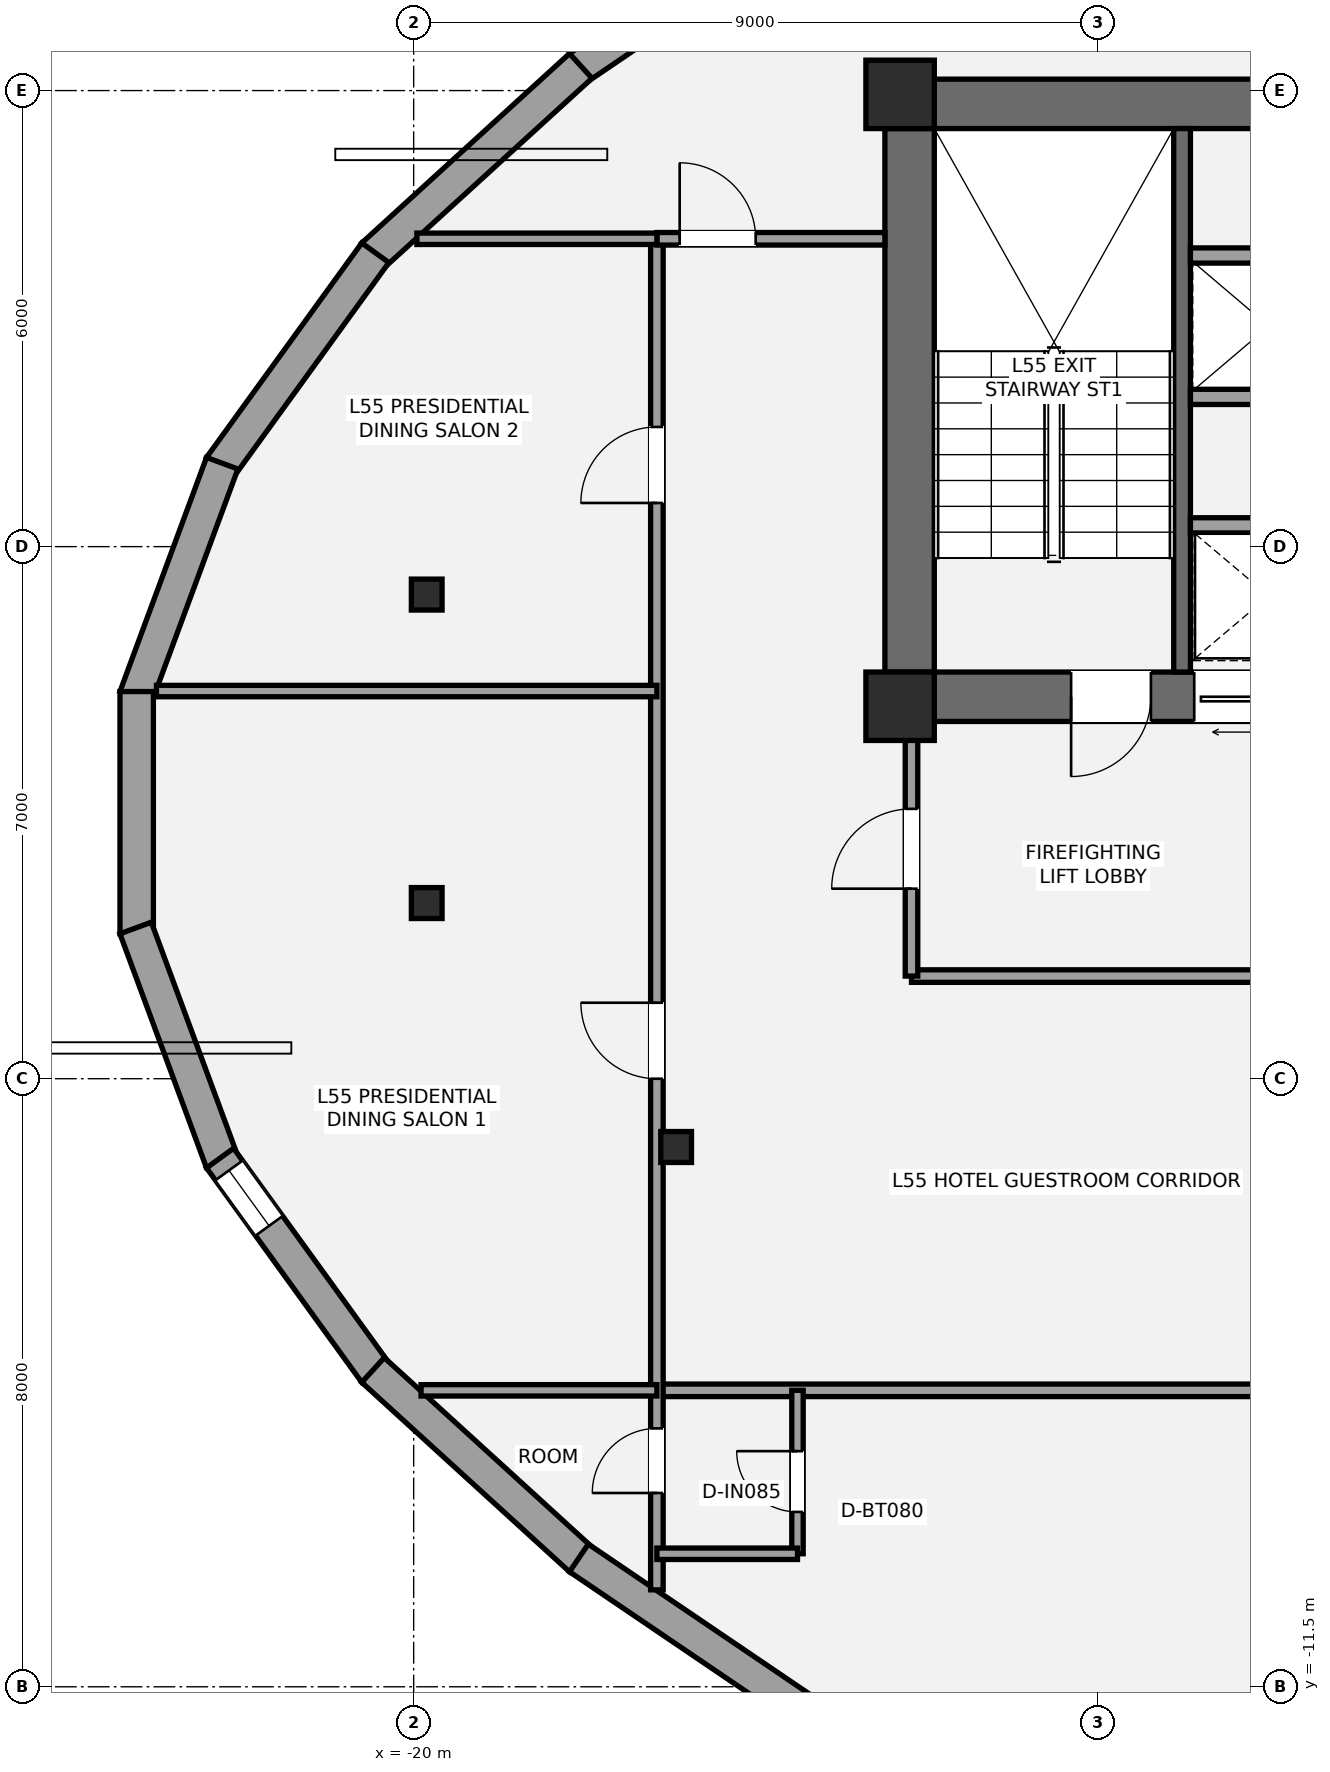
"""IFC4 building model, lengths in metres.
Left out: names, types, materials, properties, quantities, classifications, styles, units other than length and angle.
Written with IfcOpenShell. Run it as: python <this file> out.ifc"""

import sys

from ifc_helpers import new_model, si_unit, direction, frame, frame_2d, origin, origin_2d, place, context, subcontext, project, spatial, rectangle, i_section, extrude, element, fill, save


model = new_model("IFC4")
c1 = context("Model", 3, precision=1e-05, world=origin(), true_north=direction((0.0, 1.0)))
c2 = subcontext(c1, "Body", "Model", "MODEL_VIEW")
j1 = project(units=[si_unit("LENGTHUNIT", "METRE"), si_unit("PLANEANGLEUNIT", "RADIAN")], contexts=[c1])
p1 = place(None, origin())
s1 = spatial("IfcSite", under=j1, at=p1, CompositionType="ELEMENT")
p2 = place(p1, origin())
s2 = spatial("IfcBuilding", under=s1, at=p2, CompositionType="ELEMENT")
p3 = place(p2, frame((0.0, 0.0, 198.2)))
s3 = spatial("IfcBuildingStorey", under=s2, at=p3, CompositionType="ELEMENT", Elevation=198.2)
p4 = place(p3, frame((-13.475, 1.2, 0.0), z_axis=(0.0, 0.0, 1.0), x_axis=(0.0, 1.0, 0.0)))
e1 = element("IfcWall", 1, at=p4, inside=s3, PredefinedType="SHEAR", context=c2, shape_type="SweptSolid", body=[
    extrude(rectangle(XDim=8.45, YDim=0.65, at=frame_2d((4.225, 0.0))), origin(), (0.0, 0.0, 1.0), 3.2),
])
p5 = place(p3, frame((-13.8, 9.325, 0.0), z_axis=(0.0, 0.0, 1.0), x_axis=(1.0, 0.0, 0.0)))
e2 = element("IfcWall", 2, at=p5, inside=s3, PredefinedType="SHEAR", context=c2, shape_type="SweptSolid", body=[
    extrude(rectangle(XDim=9.325, YDim=0.65, at=frame_2d((4.663, 0.0))), origin(), (0.0, 0.0, 1.0), 3.2),
])
p6 = place(p3, frame((-4.875, 1.525, 0.0), z_axis=(0.0, 0.0, 1.0), x_axis=(-1.0, 0.0, 0.0)))
e3 = element("IfcWall", 3, at=p6, inside=s3, PredefinedType="SHEAR", context=c2, shape_type="SweptSolid", body=[
    extrude(rectangle(XDim=8.925, YDim=0.65, at=frame_2d((4.462, 0.0))), origin(), (0.0, 0.0, 1.0), 3.2),
])
p7 = place(p6, frame((5.425, 0.0, 0.0)))
e4 = element("IfcOpeningElement", 4, at=p7, cuts=e3, PredefinedType="OPENING", context=c2, shape_type="SweptSolid", body=[
    extrude(rectangle(XDim=1.05, YDim=2.15, at=frame_2d((0.525, 1.075))), frame((0.0, 0.335, 0.0), z_axis=(0.0, -1.0, 0.0), x_axis=(1.0, 0.0, 0.0)), (0.0, 0.0, 1.0), 0.67),
])
p8 = place(p6, frame((3.755, 0.0, 0.0)))
e5 = element("IfcOpeningElement", 5, at=p8, cuts=e3, PredefinedType="OPENING", context=c2, shape_type="SweptSolid", body=[
    extrude(rectangle(XDim=1.1, YDim=2.2, at=frame_2d((0.55, 1.1))), frame((0.0, 0.335, 0.0), z_axis=(0.0, -1.0, 0.0), x_axis=(1.0, 0.0, 0.0)), (0.0, 0.0, 1.0), 0.67),
])
p9 = place(p3, frame((-9.89, 1.85, 0.0), z_axis=(0.0, 0.0, 1.0), x_axis=(0.0, 1.0, 0.0)))
e6 = element("IfcWall", 6, at=p9, inside=s3, PredefinedType="SHEAR", context=c2, shape_type="SweptSolid", body=[
    extrude(rectangle(XDim=7.15, YDim=0.22, at=frame_2d((3.575, 0.0))), origin(), (0.0, 0.0, 1.0), 3.2),
])
for number, where, z_axis, x_axis in (
    (7, (-13.6, 1.4, 0.0), (0.0, 0.0, 1.0), (1.0, 0.0, 0.0)),
    (8, (-13.6, 9.45, 0.0), (0.0, 0.0, 1.0), (1.0, 0.0, 0.0)),
):
    element("IfcColumn", number, at=place(p3, frame(where, z_axis=z_axis, x_axis=x_axis)), inside=s3, PredefinedType="COLUMN", context=c2, shape_type="SweptSolid", body=[
        extrude(rectangle(XDim=0.9, YDim=0.9, at=origin_2d()), origin(), (0.0, 0.0, 1.0), 3.2),
    ])
for number, where, z_axis, x_axis in (
    (9, (-19.828, 2.869, 0.0), (0.0, 0.0, 1.0), (1.0, 0.0, 0.0)),
    (10, (-19.828, -1.189, 0.0), (0.0, 0.0, 1.0), (1.0, 0.0, 0.0)),
    (11, (-16.547, -4.398, 0.0), (0.0, 0.0, 1.0), (1.0, 0.0, 0.0)),
):
    element("IfcColumn", number, at=place(p3, frame(where, z_axis=z_axis, x_axis=x_axis)), inside=s3, PredefinedType="COLUMN", context=c2, shape_type="SweptSolid", body=[
        extrude(i_section(OverallWidth=0.404, OverallDepth=0.407, WebThickness=0.027, FlangeThickness=0.044, at=origin_2d()), origin(), (0.0, 0.0, 1.0), 3.2),
    ])
p10 = place(p3, frame((-17.826, 9.805, 0.0), z_axis=(0.0, 0.0, 1.0), x_axis=(0.827697624009, 0.561174342972, 0.0)))
e12 = element("IfcWall", 12, at=p10, inside=s3, PredefinedType="STANDARD", context=c2, shape_type="SweptSolid", body=[
    extrude(rectangle(XDim=3.888, YDim=0.44, at=frame_2d((1.944, 0.0))), origin(), (0.0, 0.0, 1.0), 2.255),
])
p11 = place(p10, frame((2.789, 0.0, 0.58)))
e13 = element("IfcOpeningElement", 13, at=p11, cuts=e12, PredefinedType="OPENING", context=c2, shape_type="SweptSolid", body=[
    extrude(rectangle(XDim=0.9, YDim=1.35, at=frame_2d((0.45, 0.675))), frame((0.0, 0.23, 0.0), z_axis=(0.0, -1.0, 0.0), x_axis=(1.0, 0.0, 0.0)), (0.0, 0.0, 1.0), 0.46),
])
p12 = place(p3, frame((-20.535, 7.333, 0.0), z_axis=(0.0, 0.0, 1.0), x_axis=(0.738992571182, 0.67371357396, 0.0)))
e14 = element("IfcWall", 14, at=p12, inside=s3, PredefinedType="STANDARD", context=c2, shape_type="SweptSolid", body=[
    extrude(rectangle(XDim=3.699, YDim=0.44, at=frame_2d((1.849, 0.0))), origin(), (0.0, 0.0, 1.0), 2.255),
])
p13 = place(p3, frame((-22.547, 4.545, 0.0), z_axis=(0.0, 0.0, 1.0), x_axis=(0.586378206793, 0.810037405678, 0.0)))
e15 = element("IfcWall", 15, at=p13, inside=s3, PredefinedType="STANDARD", context=c2, shape_type="SweptSolid", body=[
    extrude(rectangle(XDim=3.483, YDim=0.44, at=frame_2d((1.742, 0.0))), origin(), (0.0, 0.0, 1.0), 2.255),
])
p14 = place(p3, frame((-23.658, 1.517, 0.0), z_axis=(0.0, 0.0, 1.0), x_axis=(0.346793746495, 0.937941414691, 0.0)))
e16 = element("IfcWall", 16, at=p14, inside=s3, PredefinedType="STANDARD", context=c2, shape_type="SweptSolid", body=[
    extrude(rectangle(XDim=3.284, YDim=0.44, at=frame_2d((1.642, 0.0))), origin(), (0.0, 0.0, 1.0), 2.255),
])
p15 = place(p3, frame((-23.644, -1.594, 0.0), z_axis=(0.0, 0.0, 1.0), x_axis=(0.0, 1.0, 0.0)))
e17 = element("IfcWall", 17, at=p15, inside=s3, PredefinedType="STANDARD", context=c2, shape_type="SweptSolid", body=[
    extrude(rectangle(XDim=3.187, YDim=0.44, at=frame_2d((1.594, 0.0))), origin(), (0.0, 0.0, 1.0), 2.259),
])
p16 = place(p3, frame((-22.519, -4.597, 0.0), z_axis=(0.0, 0.0, 1.0), x_axis=(-0.346793746495, 0.937941414691, 0.0)))
e18 = element("IfcWall", 18, at=p16, inside=s3, PredefinedType="STANDARD", context=c2, shape_type="SweptSolid", body=[
    extrude(rectangle(XDim=3.284, YDim=0.44, at=frame_2d((1.642, 0.0))), origin(), (0.0, 0.0, 1.0), 2.255),
])
p17 = place(p3, frame((-20.505, -7.366, 0.0), z_axis=(0.0, 0.0, 1.0), x_axis=(-0.586378206793, 0.810037405678, 0.0)))
e19 = element("IfcWall", 19, at=p17, inside=s3, PredefinedType="STANDARD", context=c2, shape_type="SweptSolid", body=[
    extrude(rectangle(XDim=3.483, YDim=0.44, at=frame_2d((1.742, 0.0))), origin(), (0.0, 0.0, 1.0), 2.255),
])
p18 = place(p17, frame((2.383, 0.0, 0.42)))
e20 = element("IfcOpeningElement", 20, at=p18, cuts=e19, PredefinedType="OPENING", context=c2, shape_type="SweptSolid", body=[
    extrude(rectangle(XDim=0.9, YDim=1.35, at=frame_2d((0.45, 0.675))), frame((0.0, 0.23, 0.0), z_axis=(0.0, -1.0, 0.0), x_axis=(1.0, 0.0, 0.0)), (0.0, 0.0, 1.0), 0.46),
])
p19 = place(p3, frame((-17.801, -9.824, 0.0), z_axis=(0.0, 0.0, 1.0), x_axis=(-0.738992571182, 0.67371357396, 0.0)))
e21 = element("IfcWall", 21, at=p19, inside=s3, PredefinedType="STANDARD", context=c2, shape_type="SweptSolid", body=[
    extrude(rectangle(XDim=3.699, YDim=0.44, at=frame_2d((1.849, 0.0))), origin(), (0.0, 0.0, 1.0), 2.255),
])
p20 = place(p3, frame((-14.607, -11.987, 0.0), z_axis=(0.0, 0.0, 1.0), x_axis=(-0.827697624009, 0.561174342972, 0.0)))
e22 = element("IfcWall", 22, at=p20, inside=s3, PredefinedType="STANDARD", context=c2, shape_type="SweptSolid", body=[
    extrude(rectangle(XDim=3.888, YDim=0.44, at=frame_2d((1.944, 0.0))), origin(), (0.0, 0.0, 1.0), 2.255),
])
p21 = place(p3, frame((-13.45, -2.15, 0.0), z_axis=(0.0, 0.0, 1.0), x_axis=(1.0, 0.0, 0.0)))
e23 = element("IfcWall", 23, at=p21, inside=s3, PredefinedType="PARTITIONING", context=c2, shape_type="SweptSolid", body=[
    extrude(rectangle(XDim=6.25, YDim=0.165, at=frame_2d((3.125, 0.0))), origin(), (0.0, 0.0, 1.0), 2.96),
])
p22 = place(p3, frame((-13.45, -2.15, 0.0), z_axis=(0.0, 0.0, 1.0), x_axis=(0.0, 1.0, 0.0)))
e24 = element("IfcWall", 24, at=p22, inside=s3, PredefinedType="PARTITIONING", context=c2, shape_type="SweptSolid", body=[
    extrude(rectangle(XDim=3.4, YDim=0.165, at=frame_2d((1.7, 0.0))), origin(), (0.0, 0.0, 1.0), 2.413),
])
p23 = place(p22, frame((1.15, 0.0, 0.0)))
e25 = element("IfcOpeningElement", 25, at=p23, cuts=e24, PredefinedType="OPENING", context=c2, shape_type="SweptSolid", body=[
    extrude(rectangle(XDim=1.05, YDim=2.15, at=frame_2d((0.525, 1.075))), frame((0.0, 0.093, 0.0), z_axis=(0.0, -1.0, 0.0), x_axis=(1.0, 0.0, 0.0)), (0.0, 0.0, 1.0), 0.185),
])
for number, where, z_axis, x_axis in (
    (26, (-9.78, 3.78, 0.0), (0.0, 0.0, 1.0), (1.0, 0.0, 0.0)),
    (27, (-9.78, 5.47, 0.0), (0.0, 0.0, 1.0), (1.0, 0.0, 0.0)),
    (28, (-9.78, 7.33, 0.0), (0.0, 0.0, 1.0), (1.0, 0.0, 0.0)),
):
    element("IfcWall", number, at=place(p3, frame(where, z_axis=z_axis, x_axis=x_axis)), inside=s3, PredefinedType="SOLIDWALL", context=c2, shape_type="SweptSolid", body=[
        extrude(rectangle(XDim=4.255, YDim=0.2, at=frame_2d((2.127, 0.0))), origin(), (0.0, 0.0, 1.0), 2.96),
    ])
p24 = place(p3, frame((-16.8, -7.6, 0.0), z_axis=(0.0, 0.0, 1.0), x_axis=(1.0, 0.0, 0.0)))
e29 = element("IfcWall", 29, at=p24, inside=s3, PredefinedType="PARTITIONING", context=c2, shape_type="SweptSolid", body=[
    extrude(rectangle(XDim=32.35, YDim=0.165, at=frame_2d((16.175, 0.0))), origin(), (0.0, 0.0, 1.0), 2.338),
])
p25 = place(p24, frame((15.45, 0.0, 0.0)))
e30 = element("IfcOpeningElement", 30, at=p25, cuts=e29, PredefinedType="OPENING", context=c2, shape_type="SweptSolid", body=[
    extrude(rectangle(XDim=0.95, YDim=2.15, at=frame_2d((0.475, 1.075))), frame((0.0, 0.093, 0.0), z_axis=(0.0, -1.0, 0.0), x_axis=(1.0, 0.0, 0.0)), (0.0, 0.0, 1.0), 0.185),
])
p26 = place(p24, frame((31.0, 0.0, 0.0)))
e31 = element("IfcOpeningElement", 31, at=p26, cuts=e29, PredefinedType="OPENING", context=c2, shape_type="SweptSolid", body=[
    extrude(rectangle(XDim=0.95, YDim=2.15, at=frame_2d((0.475, 1.075))), frame((0.0, 0.093, 0.0), z_axis=(0.0, -1.0, 0.0), x_axis=(1.0, 0.0, 0.0)), (0.0, 0.0, 1.0), 0.185),
])
p27 = place(p3, frame((-16.8, -10.225, 0.0), z_axis=(0.0, 0.0, 1.0), x_axis=(0.0, 1.0, 0.0)))
e32 = element("IfcWall", 32, at=p27, inside=s3, PredefinedType="PARTITIONING", context=c2, shape_type="SweptSolid", body=[
    extrude(rectangle(XDim=17.775, YDim=0.165, at=frame_2d((8.888, 0.0))), origin(), (0.0, 0.0, 1.0), 2.338),
])
p28 = place(p27, frame((1.274, 0.0, 0.0)))
e33 = element("IfcOpeningElement", 33, at=p28, cuts=e32, PredefinedType="OPENING", context=c2, shape_type="SweptSolid", body=[
    extrude(rectangle(XDim=0.85, YDim=2.1, at=frame_2d((0.425, 1.05))), frame((0.0, 0.093, 0.0), z_axis=(0.0, -1.0, 0.0), x_axis=(1.0, 0.0, 0.0)), (0.0, 0.0, 1.0), 0.185),
])
p29 = place(p27, frame((6.725, 0.0, 0.0)))
e34 = element("IfcOpeningElement", 34, at=p29, cuts=e32, PredefinedType="OPENING", context=c2, shape_type="SweptSolid", body=[
    extrude(rectangle(XDim=1.0, YDim=2.15, at=frame_2d((0.5, 1.075))), frame((0.0, 0.093, 0.0), z_axis=(0.0, -1.0, 0.0), x_axis=(1.0, 0.0, 0.0)), (0.0, 0.0, 1.0), 0.185),
])
p30 = place(p27, frame((14.3, 0.0, 0.0)))
e35 = element("IfcOpeningElement", 35, at=p30, cuts=e32, PredefinedType="OPENING", context=c2, shape_type="SweptSolid", body=[
    extrude(rectangle(XDim=1.0, YDim=2.15, at=frame_2d((0.5, 1.075))), frame((0.0, 0.093, 0.0), z_axis=(0.0, -1.0, 0.0), x_axis=(1.0, 0.0, 0.0)), (0.0, 0.0, 1.0), 0.185),
])
p31 = place(p3, frame((-16.8, 7.55, 0.0), z_axis=(0.0, 0.0, 1.0), x_axis=(1.0, 0.0, 0.0)))
e36 = element("IfcWall", 36, at=p31, inside=s3, PredefinedType="PARTITIONING", context=c2, shape_type="SweptSolid", body=[
    extrude(rectangle(XDim=3.0, YDim=0.165, at=frame_2d((1.5, 0.0))), origin(), (0.0, 0.0, 1.0), 2.413),
])
p32 = place(p31, frame((0.3, 0.0, 0.0)))
e37 = element("IfcOpeningElement", 37, at=p32, cuts=e36, PredefinedType="OPENING", context=c2, shape_type="SweptSolid", body=[
    extrude(rectangle(XDim=1.0, YDim=2.15, at=frame_2d((0.5, 1.075))), frame((0.0, 0.093, 0.0), z_axis=(0.0, -1.0, 0.0), x_axis=(1.0, 0.0, 0.0)), (0.0, 0.0, 1.0), 0.185),
])
p33 = place(p3, frame((-19.958, 7.55, 0.0), z_axis=(0.0, 0.0, 1.0), x_axis=(1.0, 0.0, 0.0)))
e38 = element("IfcWall", 38, at=p33, inside=s3, PredefinedType="PLUMBINGWALL", context=c2, shape_type="SweptSolid", body=[
    extrude(rectangle(XDim=3.158, YDim=0.15, at=frame_2d((1.579, 0.0))), origin(), (0.0, 0.0, 1.0), 2.413),
])
p34 = place(p3, frame((-19.903, -7.6, 0.0), z_axis=(0.0, 0.0, 1.0), x_axis=(1.0, 0.0, 0.0)))
e39 = element("IfcWall", 39, at=p34, inside=s3, PredefinedType="PLUMBINGWALL", context=c2, shape_type="SweptSolid", body=[
    extrude(rectangle(XDim=3.103, YDim=0.15, at=frame_2d((1.551, 0.0))), origin(), (0.0, 0.0, 1.0), 2.96),
])
p35 = place(p3, frame((-14.95, -9.75, 0.0), z_axis=(0.0, 0.0, 1.0), x_axis=(0.0, 1.0, 0.0)))
e40 = element("IfcWall", 40, at=p35, inside=s3, PredefinedType="PLUMBINGWALL", context=c2, shape_type="SweptSolid", body=[
    extrude(rectangle(XDim=2.15, YDim=0.15, at=frame_2d((1.075, 0.0))), origin(), (0.0, 0.0, 1.0), 2.96),
])
p36 = place(p35, frame((0.55, 0.0, 0.0)))
e41 = element("IfcOpeningElement", 41, at=p36, cuts=e40, PredefinedType="OPENING", context=c2, shape_type="SweptSolid", body=[
    extrude(rectangle(XDim=0.8, YDim=2.1, at=frame_2d((0.4, 1.05))), frame((0.0, 0.085, 0.0), z_axis=(0.0, -1.0, 0.0), x_axis=(1.0, 0.0, 0.0)), (0.0, 0.0, 1.0), 0.17),
])
p37 = place(p3, frame((-16.8, -9.75, 0.0), z_axis=(0.0, 0.0, 1.0), x_axis=(1.0, 0.0, 0.0)))
e42 = element("IfcWall", 42, at=p37, inside=s3, PredefinedType="PLUMBINGWALL", context=c2, shape_type="SweptSolid", body=[
    extrude(rectangle(XDim=1.85, YDim=0.15, at=frame_2d((0.925, 0.0))), origin(), (0.0, 0.0, 1.0), 2.413),
])
p38 = place(p3, frame((-23.384, 1.6, 0.0), z_axis=(0.0, 0.0, 1.0), x_axis=(1.0, 0.0, 0.0)))
e43 = element("IfcWall", 43, at=p38, inside=s3, PredefinedType="PLUMBINGWALL", context=c2, shape_type="SweptSolid", body=[
    extrude(rectangle(XDim=6.584, YDim=0.15, at=frame_2d((3.292, 0.0))), origin(), (0.0, 0.0, 1.0), 2.413),
])
p39 = place(p18, origin())
e44 = element("IfcWindow", 44, at=p39, inside=s3, PartitioningType="SINGLE_PANEL", PredefinedType="WINDOW", context=c2, shape_type="SweptSolid", body=[
    extrude(rectangle(XDim=0.9, YDim=1.35, at=frame_2d((0.45, 0.675))), frame((0.0, -0.01, 0.0), z_axis=(0.0, -1.0, 0.0), x_axis=(1.0, 0.0, 0.0)), (0.0, 0.0, 1.0), 0.06),
])
fill(e20, e44)
p40 = place(p7, origin())
e45 = element("IfcDoor", 45, at=p40, inside=s3, OperationType="SINGLE_SWING_RIGHT", PredefinedType="DOOR", context=c2, shape_type="SweptSolid", body=[
    extrude(rectangle(XDim=1.05, YDim=2.15, at=frame_2d((0.525, 1.075))), frame((0.0, 0.025, 0.0), z_axis=(0.0, -1.0, 0.0), x_axis=(1.0, 0.0, 0.0)), (0.0, 0.0, 1.0), 0.05),
])
fill(e4, e45)
p41 = place(p23, origin())
e46 = element("IfcDoor", 46, at=p41, inside=s3, OperationType="SINGLE_SWING_LEFT", PredefinedType="DOOR", context=c2, shape_type="SweptSolid", body=[
    extrude(rectangle(XDim=1.05, YDim=2.15, at=frame_2d((0.525, 1.075))), frame((0.0, 0.025, 0.0), z_axis=(0.0, -1.0, 0.0), x_axis=(1.0, 0.0, 0.0)), (0.0, 0.0, 1.0), 0.05),
])
fill(e25, e46)
p42 = place(p8, origin())
e47 = element("IfcDoor", 47, at=p42, inside=s3, OperationType="SLIDING_TO_LEFT", PredefinedType="DOOR", context=c2, shape_type="SweptSolid", body=[
    extrude(rectangle(XDim=1.1, YDim=2.2, at=frame_2d((0.55, 1.1))), frame((0.0, 0.025, 0.0), z_axis=(0.0, -1.0, 0.0), x_axis=(1.0, 0.0, 0.0)), (0.0, 0.0, 1.0), 0.05),
])
fill(e5, e47)
p43 = place(p32, origin())
e48 = element("IfcDoor", 48, at=p43, inside=s3, OperationType="SINGLE_SWING_LEFT", PredefinedType="DOOR", context=c2, shape_type="SweptSolid", body=[
    extrude(rectangle(XDim=1.0, YDim=2.15, at=frame_2d((0.5, 1.075))), frame((0.0, 0.025, 0.0), z_axis=(0.0, -1.0, 0.0), x_axis=(1.0, 0.0, 0.0)), (0.0, 0.0, 1.0), 0.05),
])
fill(e37, e48)
p44 = place(p28, origin())
e49 = element("IfcDoor", 49, at=p44, inside=s3, OperationType="SINGLE_SWING_LEFT", PredefinedType="DOOR", context=c2, shape_type="SweptSolid", body=[
    extrude(rectangle(XDim=0.85, YDim=2.1, at=frame_2d((0.425, 1.05))), frame((0.0, 0.025, 0.0), z_axis=(0.0, -1.0, 0.0), x_axis=(1.0, 0.0, 0.0)), (0.0, 0.0, 1.0), 0.05),
])
fill(e33, e49)
p45 = place(p36, origin())
e50 = element("IfcDoor", 50, at=p45, inside=s3, OperationType="SINGLE_SWING_RIGHT", PredefinedType="DOOR", context=c2, shape_type="SweptSolid", body=[
    extrude(rectangle(XDim=0.8, YDim=2.1, at=frame_2d((0.4, 1.05))), frame((0.0, 0.025, 0.0), z_axis=(0.0, -1.0, 0.0), x_axis=(1.0, 0.0, 0.0)), (0.0, 0.0, 1.0), 0.05),
])
fill(e41, e50)
p46 = place(p29, origin())
e51 = element("IfcDoor", 51, at=p46, inside=s3, OperationType="SINGLE_SWING_RIGHT", PredefinedType="DOOR", context=c2, shape_type="SweptSolid", body=[
    extrude(rectangle(XDim=1.0, YDim=2.15, at=frame_2d((0.5, 1.075))), frame((0.0, 0.025, 0.0), z_axis=(0.0, -1.0, 0.0), x_axis=(1.0, 0.0, 0.0)), (0.0, 0.0, 1.0), 0.05),
])
fill(e34, e51)
p47 = place(p30, origin())
e52 = element("IfcDoor", 52, at=p47, inside=s3, OperationType="SINGLE_SWING_LEFT", PredefinedType="DOOR", context=c2, shape_type="SweptSolid", body=[
    extrude(rectangle(XDim=1.0, YDim=2.15, at=frame_2d((0.5, 1.075))), frame((0.0, 0.025, 0.0), z_axis=(0.0, -1.0, 0.0), x_axis=(1.0, 0.0, 0.0)), (0.0, 0.0, 1.0), 0.05),
])
fill(e35, e52)
save(model, sys.argv[1])
